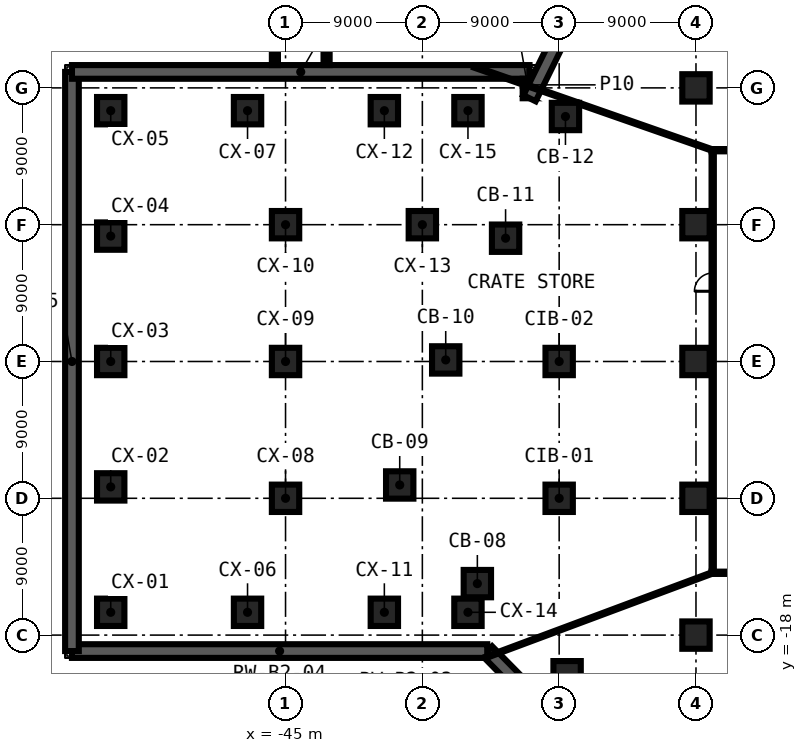
"""IFC4 building model, lengths in metres.
Left out: names, types, materials, properties, quantities, classifications, styles, units other than length and angle.
Written with IfcOpenShell. Run it as: python <this file> out.ifc"""

import sys

from ifc_helpers import new_model, si_unit, direction, frame, frame_2d, origin, origin_2d, place, context, subcontext, project, spatial, polyline, rectangle, outline, extrude, element, fill, save


model = new_model("IFC4")
c1 = context("Model", 3, precision=1e-05, world=origin(), true_north=direction((0.0, 1.0)))
c2 = subcontext(c1, "Body", "Model", "MODEL_VIEW")
j1 = project(units=[si_unit("LENGTHUNIT", "METRE"), si_unit("PLANEANGLEUNIT", "RADIAN")], contexts=[c1])
p1 = place(None, origin())
s1 = spatial("IfcSite", under=j1, at=p1, CompositionType="ELEMENT")
p2 = place(p1, origin())
s2 = spatial("IfcBuilding", under=s1, at=p2, CompositionType="ELEMENT")
p3 = place(p2, frame((0.0, 0.0, -11.5)))
s3 = spatial("IfcBuildingStorey", under=s2, at=p3, CompositionType="ELEMENT", Elevation=-11.5)
for number, where, z_axis, x_axis in (
    (1, (-26.478, -20.608, 0.0), (0.0, 0.0, 1.0), (1.0, 0.0, 0.0)),
    (2, (-32.382, -14.613, 0.0), (0.0, 0.0, 1.0), (1.0, 0.0, 0.0)),
    (3, (-37.489, -8.123, 0.0), (0.0, 0.0, 1.0), (1.0, 0.0, 0.0)),
    (4, (-34.463, 0.103, 0.0), (0.0, 0.0, 1.0), (1.0, 0.0, 0.0)),
    (5, (-30.525, 8.111, 0.0), (0.0, 0.0, 1.0), (1.0, 0.0, 0.0)),
    (6, (-26.586, 16.118, 0.0), (0.0, 0.0, 1.0), (1.0, 0.0, 0.0)),
    (7, (-27.0, -9.0, 0.0), (0.0, 0.0, 1.0), (1.0, 0.0, 0.0)),
    (8, (-27.0, 0.0, 0.0), (0.0, 0.0, 1.0), (1.0, 0.0, 0.0)),
    (9, (-18.0, -18.0, 0.0), (0.0, 0.0, 1.0), (1.0, 0.0, 0.0)),
    (10, (-18.0, -9.0, 0.0), (0.0, 0.0, 1.0), (1.0, 0.0, 0.0)),
    (11, (-18.0, 0.0, 0.0), (0.0, 0.0, 1.0), (1.0, 0.0, 0.0)),
    (12, (-18.0, 9.0, 0.0), (0.0, 0.0, 1.0), (1.0, 0.0, 0.0)),
    (13, (-18.0, 18.0, 0.0), (0.0, 0.0, 1.0), (1.0, 0.0, 0.0)),
    (14, (-56.5, -16.5, 0.0), (0.0, 0.0, 1.0), (1.0, 0.0, 0.0)),
    (15, (-56.5, -8.25, 0.0), (0.0, 0.0, 1.0), (1.0, 0.0, 0.0)),
    (16, (-56.5, 0.0, 0.0), (0.0, 0.0, 1.0), (1.0, 0.0, 0.0)),
    (17, (-56.5, 8.25, 0.0), (0.0, 0.0, 1.0), (1.0, 0.0, 0.0)),
    (18, (-56.5, 16.5, 0.0), (0.0, 0.0, 1.0), (1.0, 0.0, 0.0)),
    (19, (-47.5, -16.5, 0.0), (0.0, 0.0, 1.0), (1.0, 0.0, 0.0)),
    (20, (-47.5, 16.5, 0.0), (0.0, 0.0, 1.0), (1.0, 0.0, 0.0)),
    (21, (-45.0, -9.0, 0.0), (0.0, 0.0, 1.0), (1.0, 0.0, 0.0)),
    (22, (-45.0, 0.0, 0.0), (0.0, 0.0, 1.0), (1.0, 0.0, 0.0)),
    (23, (-45.0, 9.0, 0.0), (0.0, 0.0, 1.0), (1.0, 0.0, 0.0)),
    (24, (-38.5, -16.5, 0.0), (0.0, 0.0, 1.0), (1.0, 0.0, 0.0)),
    (25, (-38.5, 16.5, 0.0), (0.0, 0.0, 1.0), (1.0, 0.0, 0.0)),
    (26, (-36.0, 9.0, 0.0), (0.0, 0.0, 1.0), (1.0, 0.0, 0.0)),
    (27, (-33.0, -16.5, 0.0), (0.0, 0.0, 1.0), (1.0, 0.0, 0.0)),
    (28, (-33.0, 16.5, 0.0), (0.0, 0.0, 1.0), (1.0, 0.0, 0.0)),
):
    element("IfcColumn", number, at=place(p3, frame(where, z_axis=z_axis, x_axis=x_axis)), inside=s3, PredefinedType="COLUMN", context=c2, shape_type="SweptSolid", body=[
        extrude(rectangle(XDim=1.8, YDim=1.8, at=origin_2d()), origin(), (0.0, 0.0, 1.0), 5.1),
    ])
p4 = place(p3, frame((-27.89, -22.95, 0.0), z_axis=(0.0, 0.0, 1.0), x_axis=(-0.70171190232, 0.71246081025, 0.0)))
e29 = element("IfcWall", 29, at=p4, inside=s3, PredefinedType="SHEAR", context=c2, shape_type="SweptSolid", body=[
    extrude(rectangle(XDim=5.474, YDim=0.9, at=frame_2d((2.737, 0.0))), origin(), (0.0, 0.0, 1.0), 5.1),
])
p5 = place(p3, frame((-31.731, -19.05, 0.0), z_axis=(0.0, 0.0, 1.0), x_axis=(-1.0, 0.0, 0.0)))
e30 = element("IfcWall", 30, at=p5, inside=s3, PredefinedType="SHEAR", context=c2, shape_type="SweptSolid", body=[
    extrude(rectangle(XDim=27.319, YDim=0.9, at=frame_2d((13.659, 0.0))), origin(), (0.0, 0.0, 1.0), 5.1),
])
p6 = place(p3, frame((-59.05, -19.05, 0.0), z_axis=(0.0, 0.0, 1.0), x_axis=(0.0, 1.0, 0.0)))
e31 = element("IfcWall", 31, at=p6, inside=s3, PredefinedType="SHEAR", context=c2, shape_type="SweptSolid", body=[
    extrude(rectangle(XDim=38.1, YDim=0.9, at=frame_2d((19.05, 0.0))), origin(), (0.0, 0.0, 1.0), 5.1),
])
p7 = place(p3, frame((-59.05, 19.05, 0.0), z_axis=(0.0, 0.0, 1.0), x_axis=(1.0, 0.0, 0.0)))
e32 = element("IfcWall", 32, at=p7, inside=s3, PredefinedType="SHEAR", context=c2, shape_type="SweptSolid", body=[
    extrude(rectangle(XDim=30.1, YDim=0.9, at=frame_2d((15.05, 0.0))), origin(), (0.0, 0.0, 1.0), 5.1),
])
p8 = place(p3, origin())
e33 = element("IfcWall", 33, at=p8, inside=s3, PredefinedType="SHEAR", context=c2, shape_type="SweptSolid", body=[
    extrude(outline(polyline([(-29.4, 17.317), (-28.95, 17.317), (-29.354, 17.515), (-28.599, 19.05), (-28.95, 19.05), (-28.95, 18.6), (-29.4, 18.6), (-29.4, 17.317)])), origin(), (0.0, 0.0, 1.0), 5.1),
])
p9 = place(p3, frame((-28.95, 17.317, 0.0), z_axis=(0.0, 0.0, 1.0), x_axis=(0.441350917098, 0.897334590873, 0.0)))
e34 = element("IfcWall", 34, at=p9, inside=s3, PredefinedType="SHEAR", context=c2, shape_type="SweptSolid", body=[
    extrude(rectangle(XDim=15.567, YDim=0.9, at=frame_2d((7.783, 0.0))), origin(), (0.0, 0.0, 1.0), 5.1),
])
p10 = place(p3, frame((16.975, -13.9, 0.0), z_axis=(0.0, 0.0, 1.0), x_axis=(-1.0, 0.0, 0.0)))
e35 = element("IfcWall", 35, at=p10, inside=s3, PredefinedType="PARTITIONING", context=c2, shape_type="SweptSolid", body=[
    extrude(rectangle(XDim=33.95, YDim=0.15, at=frame_2d((16.975, 0.0))), origin(), (0.0, 0.0, 1.0), 5.1),
])
p11 = place(p10, frame((28.375, 0.0, 0.0)))
e36 = element("IfcOpeningElement", 36, at=p11, cuts=e35, PredefinedType="OPENING", context=c2, shape_type="SweptSolid", body=[
    extrude(rectangle(XDim=1.2, YDim=2.1, at=frame_2d((0.6, 1.05))), frame((0.0, 0.085, 0.0), z_axis=(0.0, -1.0, 0.0), x_axis=(1.0, 0.0, 0.0)), (0.0, 0.0, 1.0), 0.17),
])
p12 = place(p10, frame((15.475, 0.0, 0.0)))
e37 = element("IfcOpeningElement", 37, at=p12, cuts=e35, PredefinedType="OPENING", context=c2, shape_type="SweptSolid", body=[
    extrude(rectangle(XDim=1.2, YDim=2.1, at=frame_2d((0.6, 1.05))), frame((0.0, 0.085, 0.0), z_axis=(0.0, -1.0, 0.0), x_axis=(1.0, 0.0, 0.0)), (0.0, 0.0, 1.0), 0.17),
])
p13 = place(p3, frame((-16.975, 13.9, 0.0), z_axis=(0.0, 0.0, 1.0), x_axis=(1.0, 0.0, 0.0)))
e38 = element("IfcWall", 38, at=p13, inside=s3, PredefinedType="PARTITIONING", context=c2, shape_type="SweptSolid", body=[
    extrude(rectangle(XDim=33.95, YDim=0.15, at=frame_2d((16.975, 0.0))), origin(), (0.0, 0.0, 1.0), 5.1),
])
p14 = place(p13, frame((9.887, 0.0, 0.0)))
e39 = element("IfcOpeningElement", 39, at=p14, cuts=e38, PredefinedType="OPENING", context=c2, shape_type="SweptSolid", body=[
    extrude(rectangle(XDim=1.2, YDim=2.1, at=frame_2d((0.6, 1.05))), frame((0.0, 0.085, 0.0), z_axis=(0.0, -1.0, 0.0), x_axis=(1.0, 0.0, 0.0)), (0.0, 0.0, 1.0), 0.17),
])
p15 = place(p3, frame((-31.796, -19.454, 0.0), z_axis=(0.0, 0.0, 1.0), x_axis=(0.936976966906, 0.349391132526, 0.0)))
e40 = element("IfcWall", 40, at=p15, inside=s3, PredefinedType="PARTITIONING", context=c2, shape_type="SweptSolid", body=[
    extrude(rectangle(XDim=15.898, YDim=0.1, at=frame_2d((7.949, 0.0))), origin(), (0.0, 0.0, 1.0), 5.1),
])
p16 = place(p3, frame((-16.9, -13.825, 0.0), z_axis=(0.0, 0.0, 1.0), x_axis=(0.0, 1.0, 0.0)))
e41 = element("IfcWall", 41, at=p16, inside=s3, PredefinedType="PARTITIONING", context=c2, shape_type="SweptSolid", body=[
    extrude(rectangle(XDim=27.65, YDim=0.15, at=frame_2d((13.825, 0.0))), origin(), (0.0, 0.0, 1.0), 5.1),
])
p17 = place(p16, frame((18.445, 0.0, 0.0)))
e42 = element("IfcOpeningElement", 42, at=p17, cuts=e41, PredefinedType="OPENING", context=c2, shape_type="SweptSolid", body=[
    extrude(rectangle(XDim=1.2, YDim=2.1, at=frame_2d((0.6, 1.05))), frame((0.0, 0.085, 0.0), z_axis=(0.0, -1.0, 0.0), x_axis=(1.0, 0.0, 0.0)), (0.0, 0.0, 1.0), 0.17),
])
p18 = place(p3, frame((-32.585, 19.38, 0.0), z_axis=(0.0, 0.0, 1.0), x_axis=(0.944040530472, -0.329829466279, 0.0)))
e43 = element("IfcWall", 43, at=p18, inside=s3, PredefinedType="PARTITIONING", context=c2, shape_type="SweptSolid", body=[
    extrude(rectangle(XDim=7.161, YDim=0.1, at=frame_2d((3.58, 0.0))), origin(), (0.0, 0.0, 1.0), 5.1),
])
p19 = place(p3, frame((-25.686, 16.969, 0.0), z_axis=(0.0, 0.0, 1.0), x_axis=(0.944025503462, -0.329872473561, 0.0)))
e44 = element("IfcWall", 44, at=p19, inside=s3, PredefinedType="PARTITIONING", context=c2, shape_type="SweptSolid", body=[
    extrude(rectangle(XDim=9.307, YDim=0.1, at=frame_2d((4.653, 0.0))), origin(), (0.0, 0.0, 1.0), 5.1),
])
p20 = place(p2, origin())
s4 = spatial("IfcBuildingStorey", under=s2, at=p20, CompositionType="ELEMENT", Elevation=0.0)
for number, where, z_axis, x_axis in (
    (45, (-45.7, 19.5, -17.0), (0.0, 0.0, 1.0), (0.0, 1.0, 0.0)),
    (46, (-42.3, 19.5, -17.0), (0.0, 0.0, 1.0), (0.0, 1.0, 0.0)),
):
    element("IfcWall", number, at=place(p20, frame(where, z_axis=z_axis, x_axis=x_axis)), inside=s4, PredefinedType="SHEAR", context=c2, shape_type="SweptSolid", body=[
        extrude(rectangle(XDim=8.6, YDim=0.4, at=frame_2d((4.3, 0.0))), origin(), (0.0, 0.0, 1.0), 16.7),
    ])
p21 = place(p17, origin())
e47 = element("IfcDoor", 47, at=p21, inside=s3, OperationType="SINGLE_SWING_RIGHT", PredefinedType="DOOR", context=c2, shape_type="SweptSolid", body=[
    extrude(rectangle(XDim=1.2, YDim=2.1, at=frame_2d((0.6, 1.05))), frame((0.0, 0.025, 0.0), z_axis=(0.0, -1.0, 0.0), x_axis=(1.0, 0.0, 0.0)), (0.0, 0.0, 1.0), 0.05),
])
fill(e42, e47)
save(model, sys.argv[1])
